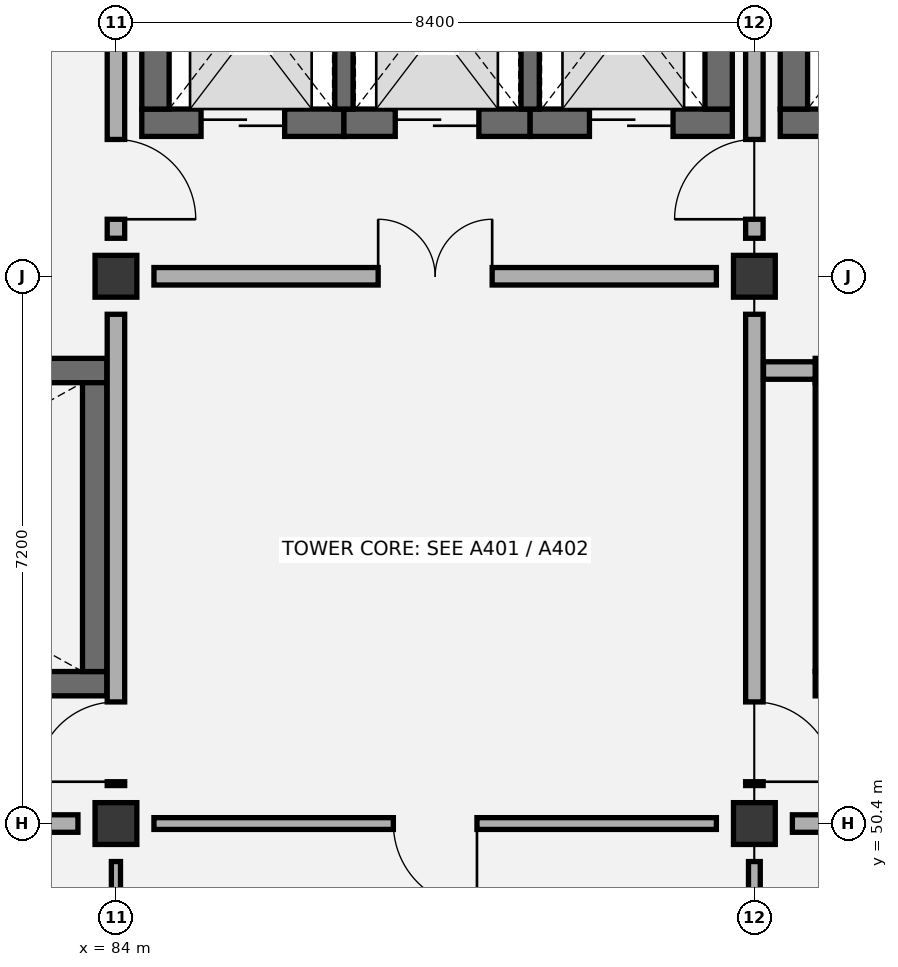
"""IFC4 building model, lengths in metres.
Left out: names, types, materials, properties, quantities, classifications, styles, units other than length and angle.
Written with IfcOpenShell. Run it as: python <this file> out.ifc"""

import sys

from ifc_helpers import new_model, si_unit, direction, frame, frame_2d, origin, origin_2d, place, context, subcontext, project, spatial, rectangle, extrude, element, fill, save


model = new_model("IFC4")
c1 = context("Model", 3, precision=1e-05, world=origin(), true_north=direction((0.0, 1.0)))
c2 = subcontext(c1, "Body", "Model", "MODEL_VIEW")
j1 = project(units=[si_unit("LENGTHUNIT", "METRE"), si_unit("PLANEANGLEUNIT", "RADIAN")], contexts=[c1])
p1 = place(None, origin())
s1 = spatial("IfcSite", under=j1, at=p1, CompositionType="ELEMENT")
p2 = place(p1, origin())
s2 = spatial("IfcBuilding", under=s1, at=p2, CompositionType="ELEMENT")
p3 = place(p2, frame((0.0, 0.0, 60.6)))
s3 = spatial("IfcBuildingStorey", under=s2, at=p3, CompositionType="ELEMENT", Elevation=60.6)
for number, where, z_axis, x_axis in (
    (1, (84.0, 50.4, 0.0), (0.0, 0.0, 1.0), (1.0, 0.0, 0.0)),
    (2, (84.0, 57.6, 0.0), (0.0, 0.0, 1.0), (1.0, 0.0, 0.0)),
    (3, (92.4, 50.4, 0.0), (0.0, 0.0, 1.0), (1.0, 0.0, 0.0)),
    (4, (92.4, 57.6, 0.0), (0.0, 0.0, 1.0), (1.0, 0.0, 0.0)),
):
    element("IfcColumn", number, at=place(p3, frame(where, z_axis=z_axis, x_axis=x_axis)), inside=s3, PredefinedType="COLUMN", context=c2, shape_type="SweptSolid", body=[
        extrude(rectangle(XDim=0.55, YDim=0.55, at=origin_2d()), origin(), (0.0, 0.0, 1.0), 4.2),
    ])
p4 = place(p3, frame((76.4, 52.24, 0.0), z_axis=(0.0, 0.0, 1.0), x_axis=(1.0, 0.0, 0.0)))
e5 = element("IfcWall", 5, at=p4, inside=s3, PredefinedType="SHEAR", context=c2, shape_type="SweptSolid", body=[
    extrude(rectangle(XDim=7.48, YDim=0.32, at=frame_2d((3.74, 0.0))), origin(), (0.0, 0.0, 1.0), 3.95),
])
p5 = place(p4, frame((0.45, 0.0, 0.0)))
e6 = element("IfcOpeningElement", 6, at=p5, cuts=e5, PredefinedType="OPENING", context=c2, shape_type="SweptSolid", body=[
    extrude(rectangle(XDim=1.05, YDim=2.15, at=frame_2d((0.525, 1.075))), frame((0.0, 0.17, 0.0), z_axis=(0.0, -1.0, 0.0), x_axis=(1.0, 0.0, 0.0)), (0.0, 0.0, 1.0), 0.34),
])
p6 = place(p3, frame((76.4, 56.36, 0.0), z_axis=(0.0, 0.0, 1.0), x_axis=(1.0, 0.0, 0.0)))
e7 = element("IfcWall", 7, at=p6, inside=s3, PredefinedType="SHEAR", context=c2, shape_type="SweptSolid", body=[
    extrude(rectangle(XDim=7.48, YDim=0.32, at=frame_2d((3.74, 0.0))), origin(), (0.0, 0.0, 1.0), 3.95),
])
p7 = place(p3, frame((83.72, 52.4, 0.0), z_axis=(0.0, 0.0, 1.0), x_axis=(0.0, 1.0, 0.0)))
e8 = element("IfcWall", 8, at=p7, inside=s3, PredefinedType="SHEAR", context=c2, shape_type="SweptSolid", body=[
    extrude(rectangle(XDim=3.8, YDim=0.32, at=frame_2d((1.9, 0.0))), origin(), (0.0, 0.0, 1.0), 3.95),
])
p8 = place(p3, frame((93.2, 52.24, 0.0), z_axis=(0.0, 0.0, 1.0), x_axis=(1.0, 0.0, 0.0)))
e9 = element("IfcWall", 9, at=p8, inside=s3, PredefinedType="SHEAR", context=c2, shape_type="SweptSolid", body=[
    extrude(rectangle(XDim=7.48, YDim=0.32, at=frame_2d((3.74, 0.0))), origin(), (0.0, 0.0, 1.0), 3.95),
])
p9 = place(p8, frame((0.45, 0.0, 0.0)))
e10 = element("IfcOpeningElement", 10, at=p9, cuts=e9, PredefinedType="OPENING", context=c2, shape_type="SweptSolid", body=[
    extrude(rectangle(XDim=1.05, YDim=2.15, at=frame_2d((0.525, 1.075))), frame((0.0, 0.17, 0.0), z_axis=(0.0, -1.0, 0.0), x_axis=(1.0, 0.0, 0.0)), (0.0, 0.0, 1.0), 0.34),
])
p10 = place(p3, frame((93.2, 56.36, 0.0), z_axis=(0.0, 0.0, 1.0), x_axis=(1.0, 0.0, 0.0)))
e11 = element("IfcWall", 11, at=p10, inside=s3, PredefinedType="SHEAR", context=c2, shape_type="SweptSolid", body=[
    extrude(rectangle(XDim=7.48, YDim=0.32, at=frame_2d((3.74, 0.0))), origin(), (0.0, 0.0, 1.0), 3.95),
])
p11 = place(p3, frame((93.36, 52.4, 0.0), z_axis=(0.0, 0.0, 1.0), x_axis=(0.0, 1.0, 0.0)))
e12 = element("IfcWall", 12, at=p11, inside=s3, PredefinedType="SHEAR", context=c2, shape_type="SweptSolid", body=[
    extrude(rectangle(XDim=3.8, YDim=0.32, at=frame_2d((1.9, 0.0))), origin(), (0.0, 0.0, 1.0), 3.95),
])
p12 = place(p3, frame((84.34, 59.62, 0.0), z_axis=(0.0, 0.0, 1.0), x_axis=(1.0, 0.0, 0.0)))
e13 = element("IfcWall", 13, at=p12, inside=s3, PredefinedType="SHEAR", context=c2, shape_type="SweptSolid", body=[
    extrude(rectangle(XDim=2.66, YDim=0.36, at=frame_2d((1.33, 0.0))), origin(), (0.0, 0.0, 1.0), 3.95),
])
p13 = place(p12, frame((0.78, 0.0, 0.0)))
e14 = element("IfcOpeningElement", 14, at=p13, cuts=e13, PredefinedType="OPENING", context=c2, shape_type="SweptSolid", body=[
    extrude(rectangle(XDim=1.1, YDim=2.15, at=frame_2d((0.55, 1.075))), frame((0.0, 0.19, 0.0), z_axis=(0.0, -1.0, 0.0), x_axis=(1.0, 0.0, 0.0)), (0.0, 0.0, 1.0), 0.38),
])
p14 = place(p3, frame((87.0, 59.62, 0.0), z_axis=(0.0, 0.0, 1.0), x_axis=(1.0, 0.0, 0.0)))
e15 = element("IfcWall", 15, at=p14, inside=s3, PredefinedType="SHEAR", context=c2, shape_type="SweptSolid", body=[
    extrude(rectangle(XDim=2.45, YDim=0.36, at=frame_2d((1.225, 0.0))), origin(), (0.0, 0.0, 1.0), 3.95),
])
p15 = place(p14, frame((0.675, 0.0, 0.0)))
e16 = element("IfcOpeningElement", 16, at=p15, cuts=e15, PredefinedType="OPENING", context=c2, shape_type="SweptSolid", body=[
    extrude(rectangle(XDim=1.1, YDim=2.15, at=frame_2d((0.55, 1.075))), frame((0.0, 0.19, 0.0), z_axis=(0.0, -1.0, 0.0), x_axis=(1.0, 0.0, 0.0)), (0.0, 0.0, 1.0), 0.38),
])
p16 = place(p3, frame((89.45, 59.62, 0.0), z_axis=(0.0, 0.0, 1.0), x_axis=(1.0, 0.0, 0.0)))
e17 = element("IfcWall", 17, at=p16, inside=s3, PredefinedType="SHEAR", context=c2, shape_type="SweptSolid", body=[
    extrude(rectangle(XDim=2.66, YDim=0.36, at=frame_2d((1.33, 0.0))), origin(), (0.0, 0.0, 1.0), 3.95),
])
p17 = place(p16, frame((0.78, 0.0, 0.0)))
e18 = element("IfcOpeningElement", 18, at=p17, cuts=e17, PredefinedType="OPENING", context=c2, shape_type="SweptSolid", body=[
    extrude(rectangle(XDim=1.1, YDim=2.15, at=frame_2d((0.55, 1.075))), frame((0.0, 0.19, 0.0), z_axis=(0.0, -1.0, 0.0), x_axis=(1.0, 0.0, 0.0)), (0.0, 0.0, 1.0), 0.38),
])
for number, where, z_axis, x_axis in (
    (19, (84.52, 59.8, 0.0), (0.0, 0.0, 1.0), (0.0, 1.0, 0.0)),
    (20, (91.93, 59.8, 0.0), (0.0, 0.0, 1.0), (0.0, 1.0, 0.0)),
):
    element("IfcWall", number, at=place(p3, frame(where, z_axis=z_axis, x_axis=x_axis)), inside=s3, PredefinedType="SHEAR", context=c2, shape_type="SweptSolid", body=[
        extrude(rectangle(XDim=2.8, YDim=0.36, at=frame_2d((1.4, 0.0))), origin(), (0.0, 0.0, 1.0), 3.95),
    ])
for number, where, z_axis, x_axis in (
    (21, (87.0, 59.8, 0.0), (0.0, 0.0, 1.0), (0.0, 1.0, 0.0)),
    (22, (89.45, 59.8, 0.0), (0.0, 0.0, 1.0), (0.0, 1.0, 0.0)),
):
    element("IfcWall", number, at=place(p3, frame(where, z_axis=z_axis, x_axis=x_axis)), inside=s3, PredefinedType="SHEAR", context=c2, shape_type="SweptSolid", body=[
        extrude(rectangle(XDim=2.8, YDim=0.24, at=frame_2d((1.4, 0.0))), origin(), (0.0, 0.0, 1.0), 3.95),
    ])
p18 = place(p3, frame((92.74, 59.62, 0.0), z_axis=(0.0, 0.0, 1.0), x_axis=(1.0, 0.0, 0.0)))
e23 = element("IfcWall", 23, at=p18, inside=s3, PredefinedType="SHEAR", context=c2, shape_type="SweptSolid", body=[
    extrude(rectangle(XDim=2.87, YDim=0.36, at=frame_2d((1.435, 0.0))), origin(), (0.0, 0.0, 1.0), 3.95),
])
p19 = place(p18, frame((0.76, 0.0, 0.0)))
e24 = element("IfcOpeningElement", 24, at=p19, cuts=e23, PredefinedType="OPENING", context=c2, shape_type="SweptSolid", body=[
    extrude(rectangle(XDim=1.35, YDim=2.2, at=frame_2d((0.675, 1.1))), frame((0.0, 0.19, 0.0), z_axis=(0.0, -1.0, 0.0), x_axis=(1.0, 0.0, 0.0)), (0.0, 0.0, 1.0), 0.38),
])
p20 = place(p3, frame((92.92, 59.8, 0.0), z_axis=(0.0, 0.0, 1.0), x_axis=(0.0, 1.0, 0.0)))
e25 = element("IfcWall", 25, at=p20, inside=s3, PredefinedType="SHEAR", context=c2, shape_type="SweptSolid", body=[
    extrude(rectangle(XDim=2.8, YDim=0.36, at=frame_2d((1.4, 0.0))), origin(), (0.0, 0.0, 1.0), 3.95),
])
p21 = place(p3, frame((84.0, 43.7, 0.0), z_axis=(0.0, 0.0, 1.0), x_axis=(0.0, 1.0, 0.0)))
e26 = element("IfcWall", 26, at=p21, inside=s3, PredefinedType="PARTITIONING", context=c2, shape_type="SweptSolid", body=[
    extrude(rectangle(XDim=6.2, YDim=0.12, at=frame_2d((3.1, 0.0))), origin(), (0.0, 0.0, 1.0), 3.445),
])
p22 = place(p3, frame((76.1, 50.4, 0.0), z_axis=(0.0, 0.0, 1.0), x_axis=(1.0, 0.0, 0.0)))
e27 = element("IfcWall", 27, at=p22, inside=s3, PredefinedType="PARTITIONING", context=c2, shape_type="SweptSolid", body=[
    extrude(rectangle(XDim=7.4, YDim=0.23, at=frame_2d((3.7, 0.0))), origin(), (0.0, 0.0, 1.0), 3.545),
])
p23 = place(p22, frame((2.95, 0.0, 0.0)))
e28 = element("IfcOpeningElement", 28, at=p23, cuts=e27, PredefinedType="OPENING", context=c2, shape_type="SweptSolid", body=[
    extrude(rectangle(XDim=1.5, YDim=2.15, at=frame_2d((0.75, 1.075))), frame((0.0, 0.125, 0.0), z_axis=(0.0, -1.0, 0.0), x_axis=(1.0, 0.0, 0.0)), (0.0, 0.0, 1.0), 0.25),
])
p24 = place(p3, frame((84.0, 50.9, 0.0), z_axis=(0.0, 0.0, 1.0), x_axis=(0.0, 1.0, 0.0)))
e29 = element("IfcWall", 29, at=p24, inside=s3, PredefinedType="PARTITIONING", context=c2, shape_type="SweptSolid", body=[
    extrude(rectangle(XDim=6.2, YDim=0.23, at=frame_2d((3.1, 0.0))), origin(), (0.0, 0.0, 1.0), 3.545),
])
p25 = place(p24, frame((0.05, 0.0, 0.0)))
e30 = element("IfcOpeningElement", 30, at=p25, cuts=e29, PredefinedType="OPENING", context=c2, shape_type="SweptSolid", body=[
    extrude(rectangle(XDim=1.05, YDim=2.15, at=frame_2d((0.525, 1.075))), frame((0.0, 0.125, 0.0), z_axis=(0.0, -1.0, 0.0), x_axis=(1.0, 0.0, 0.0)), (0.0, 0.0, 1.0), 0.25),
])
p26 = place(p3, frame((84.0, 58.1, 0.0), z_axis=(0.0, 0.0, 1.0), x_axis=(0.0, 1.0, 0.0)))
e31 = element("IfcWall", 31, at=p26, inside=s3, PredefinedType="PARTITIONING", context=c2, shape_type="SweptSolid", body=[
    extrude(rectangle(XDim=6.2, YDim=0.23, at=frame_2d((3.1, 0.0))), origin(), (0.0, 0.0, 1.0), 3.445),
])
p27 = place(p26, frame((0.25, 0.0, 0.0)))
e32 = element("IfcOpeningElement", 32, at=p27, cuts=e31, PredefinedType="OPENING", context=c2, shape_type="SweptSolid", body=[
    extrude(rectangle(XDim=1.05, YDim=2.15, at=frame_2d((0.525, 1.075))), frame((0.0, 0.125, 0.0), z_axis=(0.0, -1.0, 0.0), x_axis=(1.0, 0.0, 0.0)), (0.0, 0.0, 1.0), 0.25),
])
p28 = place(p3, frame((92.4, 43.7, 0.0), z_axis=(0.0, 0.0, 1.0), x_axis=(0.0, 1.0, 0.0)))
e33 = element("IfcWall", 33, at=p28, inside=s3, PredefinedType="PARTITIONING", context=c2, shape_type="SweptSolid", body=[
    extrude(rectangle(XDim=6.2, YDim=0.155, at=frame_2d((3.1, 0.0))), origin(), (0.0, 0.0, 1.0), 3.545),
])
p29 = place(p28, frame((2.525, 0.0, 0.0)))
e34 = element("IfcOpeningElement", 34, at=p29, cuts=e33, PredefinedType="OPENING", context=c2, shape_type="SweptSolid", body=[
    extrude(rectangle(XDim=1.15, YDim=2.1, at=frame_2d((0.575, 1.05))), frame((0.0, 0.087, 0.0), z_axis=(0.0, -1.0, 0.0), x_axis=(1.0, 0.0, 0.0)), (0.0, 0.0, 1.0), 0.175),
])
p30 = place(p3, frame((84.5, 50.4, 0.0), z_axis=(0.0, 0.0, 1.0), x_axis=(1.0, 0.0, 0.0)))
e35 = element("IfcWall", 35, at=p30, inside=s3, PredefinedType="PARTITIONING", context=c2, shape_type="SweptSolid", body=[
    extrude(rectangle(XDim=7.4, YDim=0.155, at=frame_2d((3.7, 0.0))), origin(), (0.0, 0.0, 1.0), 3.595),
])
p31 = place(p30, frame((3.15, 0.0, 0.0)))
e36 = element("IfcOpeningElement", 36, at=p31, cuts=e35, PredefinedType="OPENING", context=c2, shape_type="SweptSolid", body=[
    extrude(rectangle(XDim=1.1, YDim=2.1, at=frame_2d((0.55, 1.05))), frame((0.0, 0.087, 0.0), z_axis=(0.0, -1.0, 0.0), x_axis=(1.0, 0.0, 0.0)), (0.0, 0.0, 1.0), 0.175),
])
p32 = place(p3, frame((92.4, 50.9, 0.0), z_axis=(0.0, 0.0, 1.0), x_axis=(0.0, 1.0, 0.0)))
e37 = element("IfcWall", 37, at=p32, inside=s3, PredefinedType="PARTITIONING", context=c2, shape_type="SweptSolid", body=[
    extrude(rectangle(XDim=6.2, YDim=0.23, at=frame_2d((3.1, 0.0))), origin(), (0.0, 0.0, 1.0), 3.445),
])
p33 = place(p32, frame((0.05, 0.0, 0.0)))
e38 = element("IfcOpeningElement", 38, at=p33, cuts=e37, PredefinedType="OPENING", context=c2, shape_type="SweptSolid", body=[
    extrude(rectangle(XDim=1.05, YDim=2.15, at=frame_2d((0.525, 1.075))), frame((0.0, 0.125, 0.0), z_axis=(0.0, -1.0, 0.0), x_axis=(1.0, 0.0, 0.0)), (0.0, 0.0, 1.0), 0.25),
])
p34 = place(p3, frame((84.5, 57.6, 0.0), z_axis=(0.0, 0.0, 1.0), x_axis=(1.0, 0.0, 0.0)))
e39 = element("IfcWall", 39, at=p34, inside=s3, PredefinedType="PARTITIONING", context=c2, shape_type="SweptSolid", body=[
    extrude(rectangle(XDim=7.4, YDim=0.23, at=frame_2d((3.7, 0.0))), origin(), (0.0, 0.0, 1.0), 3.595),
])
p35 = place(p34, frame((2.95, 0.0, 0.0)))
e40 = element("IfcOpeningElement", 40, at=p35, cuts=e39, PredefinedType="OPENING", context=c2, shape_type="SweptSolid", body=[
    extrude(rectangle(XDim=1.5, YDim=2.15, at=frame_2d((0.75, 1.075))), frame((0.0, 0.125, 0.0), z_axis=(0.0, -1.0, 0.0), x_axis=(1.0, 0.0, 0.0)), (0.0, 0.0, 1.0), 0.25),
])
p36 = place(p3, frame((92.4, 58.1, 0.0), z_axis=(0.0, 0.0, 1.0), x_axis=(0.0, 1.0, 0.0)))
e41 = element("IfcWall", 41, at=p36, inside=s3, PredefinedType="PARTITIONING", context=c2, shape_type="SweptSolid", body=[
    extrude(rectangle(XDim=6.2, YDim=0.23, at=frame_2d((3.1, 0.0))), origin(), (0.0, 0.0, 1.0), 3.655),
])
p37 = place(p36, frame((0.25, 0.0, 0.0)))
e42 = element("IfcOpeningElement", 42, at=p37, cuts=e41, PredefinedType="OPENING", context=c2, shape_type="SweptSolid", body=[
    extrude(rectangle(XDim=1.05, YDim=2.15, at=frame_2d((0.525, 1.075))), frame((0.0, 0.125, 0.0), z_axis=(0.0, -1.0, 0.0), x_axis=(1.0, 0.0, 0.0)), (0.0, 0.0, 1.0), 0.25),
])
p38 = place(p3, frame((92.9, 50.4, 0.0), z_axis=(0.0, 0.0, 1.0), x_axis=(1.0, 0.0, 0.0)))
e43 = element("IfcWall", 43, at=p38, inside=s3, PredefinedType="PARTITIONING", context=c2, shape_type="SweptSolid", body=[
    extrude(rectangle(XDim=7.4, YDim=0.23, at=frame_2d((3.7, 0.0))), origin(), (0.0, 0.0, 1.0), 3.655),
])
p39 = place(p38, frame((2.95, 0.0, 0.0)))
e44 = element("IfcOpeningElement", 44, at=p39, cuts=e43, PredefinedType="OPENING", context=c2, shape_type="SweptSolid", body=[
    extrude(rectangle(XDim=1.5, YDim=2.15, at=frame_2d((0.75, 1.075))), frame((0.0, 0.125, 0.0), z_axis=(0.0, -1.0, 0.0), x_axis=(1.0, 0.0, 0.0)), (0.0, 0.0, 1.0), 0.25),
])
p40 = place(p3, frame((92.52, 56.36, 0.0), z_axis=(0.0, 0.0, 1.0), x_axis=(1.0, 0.0, 0.0)))
e45 = element("IfcWall", 45, at=p40, inside=s3, PredefinedType="PARTITIONING", context=c2, shape_type="SweptSolid", body=[
    extrude(rectangle(XDim=0.68, YDim=0.23, at=frame_2d((0.34, 0.0))), origin(), (0.0, 0.0, 1.0), 3.95),
])
p41 = place(p13, origin())
e46 = element("IfcDoor", 46, at=p41, inside=s3, OperationType="DOUBLE_DOOR_SLIDING", PredefinedType="DOOR", context=c2, shape_type="SweptSolid", body=[
    extrude(rectangle(XDim=1.1, YDim=2.15, at=frame_2d((0.55, 1.075))), frame((0.0, 0.025, 0.0), z_axis=(0.0, -1.0, 0.0), x_axis=(1.0, 0.0, 0.0)), (0.0, 0.0, 1.0), 0.05),
])
fill(e14, e46)
p42 = place(p15, origin())
e47 = element("IfcDoor", 47, at=p42, inside=s3, OperationType="DOUBLE_DOOR_SLIDING", PredefinedType="DOOR", context=c2, shape_type="SweptSolid", body=[
    extrude(rectangle(XDim=1.1, YDim=2.15, at=frame_2d((0.55, 1.075))), frame((0.0, 0.025, 0.0), z_axis=(0.0, -1.0, 0.0), x_axis=(1.0, 0.0, 0.0)), (0.0, 0.0, 1.0), 0.05),
])
fill(e16, e47)
p43 = place(p17, origin())
e48 = element("IfcDoor", 48, at=p43, inside=s3, OperationType="DOUBLE_DOOR_SLIDING", PredefinedType="DOOR", context=c2, shape_type="SweptSolid", body=[
    extrude(rectangle(XDim=1.1, YDim=2.15, at=frame_2d((0.55, 1.075))), frame((0.0, 0.025, 0.0), z_axis=(0.0, -1.0, 0.0), x_axis=(1.0, 0.0, 0.0)), (0.0, 0.0, 1.0), 0.05),
])
fill(e18, e48)
p44 = place(p25, origin())
e49 = element("IfcDoor", 49, at=p44, inside=s3, OperationType="SINGLE_SWING_LEFT", PredefinedType="DOOR", context=c2, shape_type="SweptSolid", body=[
    extrude(rectangle(XDim=1.05, YDim=2.15, at=frame_2d((0.525, 1.075))), frame((0.0, 0.025, 0.0), z_axis=(0.0, -1.0, 0.0), x_axis=(1.0, 0.0, 0.0)), (0.0, 0.0, 1.0), 0.05),
])
fill(e30, e49)
p45 = place(p27, frame((1.05, 0.0, 0.0), z_axis=(0.0, 0.0, 1.0), x_axis=(-1.0, 0.0, 0.0)))
e50 = element("IfcDoor", 50, at=p45, inside=s3, OperationType="SINGLE_SWING_RIGHT", PredefinedType="DOOR", context=c2, shape_type="SweptSolid", body=[
    extrude(rectangle(XDim=1.05, YDim=2.15, at=frame_2d((0.525, 1.075))), frame((0.0, 0.025, 0.0), z_axis=(0.0, -1.0, 0.0), x_axis=(1.0, 0.0, 0.0)), (0.0, 0.0, 1.0), 0.05),
])
fill(e32, e50)
p46 = place(p31, frame((1.1, 0.0, 0.0), z_axis=(0.0, 0.0, 1.0), x_axis=(-1.0, 0.0, 0.0)))
e51 = element("IfcDoor", 51, at=p46, inside=s3, OperationType="SINGLE_SWING_LEFT", PredefinedType="DOOR", context=c2, shape_type="SweptSolid", body=[
    extrude(rectangle(XDim=1.1, YDim=2.1, at=frame_2d((0.55, 1.05))), frame((0.0, 0.025, 0.0), z_axis=(0.0, -1.0, 0.0), x_axis=(1.0, 0.0, 0.0)), (0.0, 0.0, 1.0), 0.05),
])
fill(e36, e51)
p47 = place(p33, frame((1.05, 0.0, 0.0), z_axis=(0.0, 0.0, 1.0), x_axis=(-1.0, 0.0, 0.0)))
e52 = element("IfcDoor", 52, at=p47, inside=s3, OperationType="SINGLE_SWING_RIGHT", PredefinedType="DOOR", context=c2, shape_type="SweptSolid", body=[
    extrude(rectangle(XDim=1.05, YDim=2.15, at=frame_2d((0.525, 1.075))), frame((0.0, 0.025, 0.0), z_axis=(0.0, -1.0, 0.0), x_axis=(1.0, 0.0, 0.0)), (0.0, 0.0, 1.0), 0.05),
])
fill(e38, e52)
p48 = place(p35, origin())
e53 = element("IfcDoor", 53, at=p48, inside=s3, OperationType="DOUBLE_DOOR_SINGLE_SWING", PredefinedType="DOOR", context=c2, shape_type="SweptSolid", body=[
    extrude(rectangle(XDim=1.5, YDim=2.15, at=frame_2d((0.75, 1.075))), frame((0.0, 0.025, 0.0), z_axis=(0.0, -1.0, 0.0), x_axis=(1.0, 0.0, 0.0)), (0.0, 0.0, 1.0), 0.05),
])
fill(e40, e53)
p49 = place(p37, origin())
e54 = element("IfcDoor", 54, at=p49, inside=s3, OperationType="SINGLE_SWING_LEFT", PredefinedType="DOOR", context=c2, shape_type="SweptSolid", body=[
    extrude(rectangle(XDim=1.05, YDim=2.15, at=frame_2d((0.525, 1.075))), frame((0.0, 0.025, 0.0), z_axis=(0.0, -1.0, 0.0), x_axis=(1.0, 0.0, 0.0)), (0.0, 0.0, 1.0), 0.05),
])
fill(e42, e54)
save(model, sys.argv[1])
